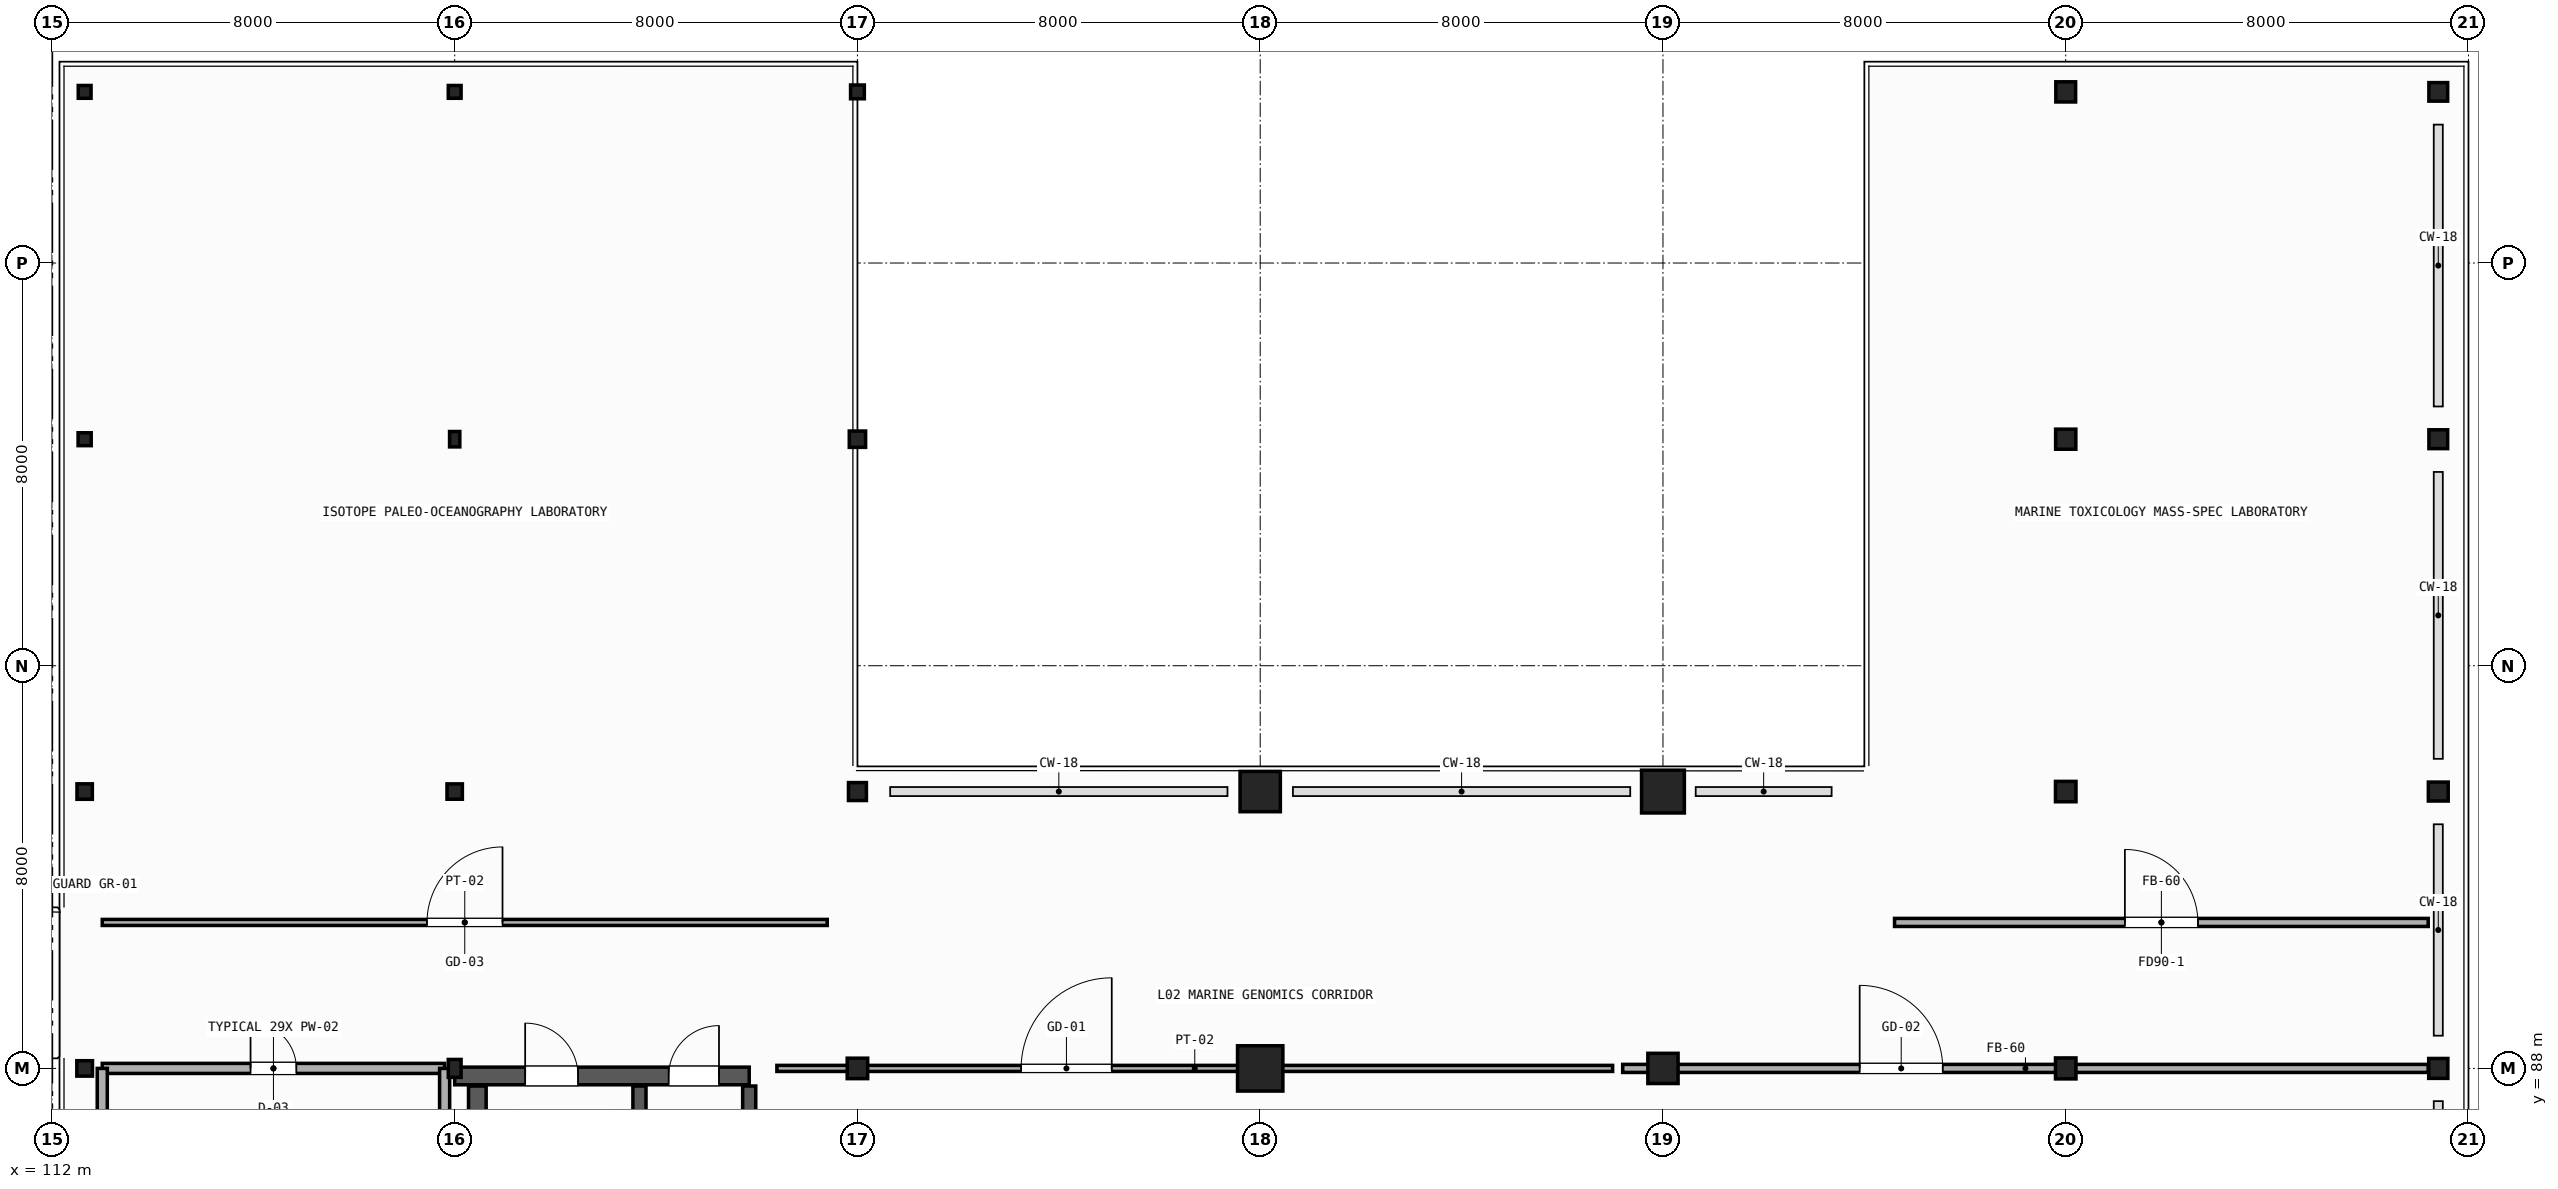
"""IFC4 building model, lengths in metres.
Left out: names, types, materials, properties, quantities, classifications, styles, units other than length and angle.
Written with IfcOpenShell. Run it as: python <this file> out.ifc"""

import sys

from ifc_helpers import new_model, si_unit, direction, frame, frame_2d, origin, origin_2d, place, context, subcontext, project, spatial, rectangle, hollow_rectangle, circle, hollow_circle, i_section, extrude, element, fill, save


model = new_model("IFC4")
c1 = context("Model", 3, precision=1e-05, world=origin(), true_north=direction((0.0, 1.0)))
c2 = subcontext(c1, "Body", "Model", "MODEL_VIEW")
j1 = project(units=[si_unit("LENGTHUNIT", "METRE"), si_unit("PLANEANGLEUNIT", "RADIAN")], contexts=[c1])
p1 = place(None, origin())
s1 = spatial("IfcSite", under=j1, at=p1, CompositionType="ELEMENT")
p2 = place(p1, origin())
s2 = spatial("IfcBuilding", under=s1, at=p2, CompositionType="ELEMENT")
p3 = place(p2, frame((0.0, 0.0, 10.2)))
s3 = spatial("IfcBuildingStorey", under=s2, at=p3, CompositionType="ELEMENT", Elevation=10.2)
p4 = place(p3, frame((112.65, 88.0, 0.0), z_axis=(0.0, 0.0, 1.0), x_axis=(0.0, 1.0, 0.0)))
e1 = element("IfcColumn", 1, at=p4, inside=s3, PredefinedType="COLUMN", context=c2, shape_type="SweptSolid", body=[
    extrude(i_section(OverallWidth=0.306, OverallDepth=0.311, WebThickness=0.011, FlangeThickness=0.017, FilletRadius=0.013, at=origin_2d()), origin(), (0.0, 0.0, 1.0), 4.56),
])
p5 = place(p3, frame((112.65, 93.5, 0.0), z_axis=(0.0, 0.0, 1.0), x_axis=(1.0, 0.0, 0.0)))
e2 = element("IfcColumn", 2, at=p5, inside=s3, PredefinedType="COLUMN", context=c2, shape_type="SweptSolid", body=[
    extrude(i_section(OverallWidth=0.305, OverallDepth=0.307, WebThickness=0.01, FlangeThickness=0.015, FilletRadius=0.013, at=origin_2d()), origin(), (0.0, 0.0, 1.0), 4.56),
])
p6 = place(p3, frame((112.65, 100.5, 0.0), z_axis=(0.0, 0.0, 1.0), x_axis=(0.0, 1.0, 0.0)))
e3 = element("IfcColumn", 3, at=p6, inside=s3, PredefinedType="COLUMN", context=c2, shape_type="SweptSolid", body=[
    extrude(i_section(OverallWidth=0.256, OverallDepth=0.26, WebThickness=0.011, FlangeThickness=0.017, FilletRadius=0.011, at=origin_2d()), origin(), (0.0, 0.0, 1.0), 4.56),
])
p7 = place(p3, frame((112.65, 107.4, 0.0), z_axis=(0.0, 0.0, 1.0), x_axis=(1.0, 0.0, 0.0)))
e4 = element("IfcColumn", 4, at=p7, inside=s3, PredefinedType="COLUMN", context=c2, shape_type="SweptSolid", body=[
    extrude(i_section(OverallWidth=0.254, OverallDepth=0.254, WebThickness=0.009, FlangeThickness=0.014, FilletRadius=0.011, at=origin_2d()), origin(), (0.0, 0.0, 1.0), 4.56),
])
p8 = place(p3, frame((120.0, 88.0, 0.0), z_axis=(0.0, 0.0, 1.0), x_axis=(1.0, 0.0, 0.0)))
e5 = element("IfcColumn", 5, at=p8, inside=s3, PredefinedType="COLUMN", context=c2, shape_type="SweptSolid", body=[
    extrude(hollow_rectangle(XDim=0.254, YDim=0.356, WallThickness=0.012, InnerFilletRadius=0.012, OuterFilletRadius=0.024, at=origin_2d()), origin(), (0.0, 0.0, 1.0), 4.56),
])
p9 = place(p3, frame((120.0, 93.5, 0.0), z_axis=(0.0, 0.0, 1.0), x_axis=(0.0, 1.0, 0.0)))
e6 = element("IfcColumn", 6, at=p9, inside=s3, PredefinedType="COLUMN", context=c2, shape_type="SweptSolid", body=[
    extrude(hollow_rectangle(XDim=0.305, YDim=0.305, WallThickness=0.012, InnerFilletRadius=0.012, OuterFilletRadius=0.024, at=origin_2d()), origin(), (0.0, 0.0, 1.0), 4.56),
])
p10 = place(p3, frame((120.0, 100.5, 0.0), z_axis=(0.0, 0.0, 1.0), x_axis=(1.0, 0.0, 0.0)))
e7 = element("IfcColumn", 7, at=p10, inside=s3, PredefinedType="COLUMN", context=c2, shape_type="SweptSolid", body=[
    extrude(hollow_rectangle(XDim=0.203, YDim=0.305, WallThickness=0.009, InnerFilletRadius=0.009, OuterFilletRadius=0.018, at=origin_2d()), origin(), (0.0, 0.0, 1.0), 4.56),
])
p11 = place(p3, frame((120.0, 107.4, 0.0), z_axis=(0.0, 0.0, 1.0), x_axis=(0.0, 1.0, 0.0)))
e8 = element("IfcColumn", 8, at=p11, inside=s3, PredefinedType="COLUMN", context=c2, shape_type="SweptSolid", body=[
    extrude(hollow_rectangle(XDim=0.254, YDim=0.254, WallThickness=0.012, InnerFilletRadius=0.012, OuterFilletRadius=0.024, at=origin_2d()), origin(), (0.0, 0.0, 1.0), 4.56),
])
p12 = place(p3, frame((128.0, 88.0, 0.0), z_axis=(0.0, 0.0, 1.0), x_axis=(0.0, 1.0, 0.0)))
e9 = element("IfcColumn", 9, at=p12, inside=s3, PredefinedType="COLUMN", context=c2, shape_type="SweptSolid", body=[
    extrude(hollow_circle(Radius=0.203, WallThickness=0.012, at=origin_2d()), origin(), (0.0, 0.0, 1.0), 4.56),
])
p13 = place(p3, frame((128.0, 93.5, 0.0), z_axis=(0.0, 0.0, 1.0), x_axis=(1.0, 0.0, 0.0)))
e10 = element("IfcColumn", 10, at=p13, inside=s3, PredefinedType="COLUMN", context=c2, shape_type="SweptSolid", body=[
    extrude(hollow_circle(Radius=0.178, WallThickness=0.012, at=origin_2d()), origin(), (0.0, 0.0, 1.0), 4.56),
])
p14 = place(p3, frame((128.0, 100.5, 0.0), z_axis=(0.0, 0.0, 1.0), x_axis=(0.0, 1.0, 0.0)))
e11 = element("IfcColumn", 11, at=p14, inside=s3, PredefinedType="COLUMN", context=c2, shape_type="SweptSolid", body=[
    extrude(hollow_circle(Radius=0.162, WallThickness=0.012, at=origin_2d()), origin(), (0.0, 0.0, 1.0), 4.56),
])
p15 = place(p3, frame((128.0, 107.4, 0.0), z_axis=(0.0, 0.0, 1.0), x_axis=(1.0, 0.0, 0.0)))
e12 = element("IfcColumn", 12, at=p15, inside=s3, PredefinedType="COLUMN", context=c2, shape_type="SweptSolid", body=[
    extrude(hollow_circle(Radius=0.136, WallThickness=0.012, at=origin_2d()), origin(), (0.0, 0.0, 1.0), 4.56),
])
p16 = place(p3, frame((136.0, 88.0, 0.0), z_axis=(0.0, 0.0, 1.0), x_axis=(1.0, 0.0, 0.0)))
e13 = element("IfcColumn", 13, at=p16, inside=s3, PredefinedType="COLUMN", context=c2, shape_type="SweptSolid", body=[
    extrude(rectangle(XDim=0.9, YDim=0.9, at=origin_2d()), origin(), (0.0, 0.0, 1.0), 4.56),
])
p17 = place(p3, frame((136.0, 93.5, 0.0), z_axis=(0.0, 0.0, 1.0), x_axis=(0.0, 1.0, 0.0)))
e14 = element("IfcColumn", 14, at=p17, inside=s3, PredefinedType="COLUMN", context=c2, shape_type="SweptSolid", body=[
    extrude(rectangle(XDim=0.8, YDim=0.8, at=origin_2d()), origin(), (0.0, 0.0, 1.0), 4.56),
])
p18 = place(p3, frame((144.0, 88.0, 0.0), z_axis=(0.0, 0.0, 1.0), x_axis=(0.0, 1.0, 0.0)))
e15 = element("IfcColumn", 15, at=p18, inside=s3, PredefinedType="COLUMN", context=c2, shape_type="SweptSolid", body=[
    extrude(rectangle(XDim=0.6, YDim=0.6, at=origin_2d()), origin(), (0.0, 0.0, 1.0), 4.56),
])
p19 = place(p3, frame((144.0, 93.5, 0.0), z_axis=(0.0, 0.0, 1.0), x_axis=(1.0, 0.0, 0.0)))
e16 = element("IfcColumn", 16, at=p19, inside=s3, PredefinedType="COLUMN", context=c2, shape_type="SweptSolid", body=[
    extrude(circle(Radius=0.425, at=origin_2d()), origin(), (0.0, 0.0, 1.0), 4.56),
])
p20 = place(p3, frame((152.0, 88.0, 0.0), z_axis=(0.0, 0.0, 1.0), x_axis=(1.0, 0.0, 0.0)))
e17 = element("IfcColumn", 17, at=p20, inside=s3, PredefinedType="COLUMN", context=c2, shape_type="SweptSolid", body=[
    extrude(i_section(OverallWidth=0.406, OverallDepth=0.416, WebThickness=0.03, FlangeThickness=0.048, FilletRadius=0.015, at=origin_2d()), origin(), (0.0, 0.0, 1.0), 4.56),
])
p21 = place(p3, frame((152.0, 93.5, 0.0), z_axis=(0.0, 0.0, 1.0), x_axis=(0.0, 1.0, 0.0)))
e18 = element("IfcColumn", 18, at=p21, inside=s3, PredefinedType="COLUMN", context=c2, shape_type="SweptSolid", body=[
    extrude(i_section(OverallWidth=0.404, OverallDepth=0.407, WebThickness=0.027, FlangeThickness=0.044, FilletRadius=0.015, at=origin_2d()), origin(), (0.0, 0.0, 1.0), 4.56),
])
p22 = place(p3, frame((152.0, 100.5, 0.0), z_axis=(0.0, 0.0, 1.0), x_axis=(1.0, 0.0, 0.0)))
e19 = element("IfcColumn", 19, at=p22, inside=s3, PredefinedType="COLUMN", context=c2, shape_type="SweptSolid", body=[
    extrude(i_section(OverallWidth=0.401, OverallDepth=0.399, WebThickness=0.025, FlangeThickness=0.04, FilletRadius=0.015, at=origin_2d()), origin(), (0.0, 0.0, 1.0), 4.8),
])
p23 = place(p3, frame((152.0, 107.4, 0.0), z_axis=(0.0, 0.0, 1.0), x_axis=(0.0, 1.0, 0.0)))
e20 = element("IfcColumn", 20, at=p23, inside=s3, PredefinedType="COLUMN", context=c2, shape_type="SweptSolid", body=[
    extrude(i_section(OverallWidth=0.4, OverallDepth=0.393, WebThickness=0.023, FlangeThickness=0.037, FilletRadius=0.015, at=origin_2d()), origin(), (0.0, 0.0, 1.0), 4.8),
])
p24 = place(p3, frame((159.4, 88.0, 0.0), z_axis=(0.0, 0.0, 1.0), x_axis=(0.0, 1.0, 0.0)))
e21 = element("IfcColumn", 21, at=p24, inside=s3, PredefinedType="COLUMN", context=c2, shape_type="SweptSolid", body=[
    extrude(i_section(OverallWidth=0.395, OverallDepth=0.38, WebThickness=0.019, FlangeThickness=0.03, FilletRadius=0.015, at=origin_2d()), origin(), (0.0, 0.0, 1.0), 4.56),
])
p25 = place(p3, frame((159.4, 93.5, 0.0), z_axis=(0.0, 0.0, 1.0), x_axis=(1.0, 0.0, 0.0)))
e22 = element("IfcColumn", 22, at=p25, inside=s3, PredefinedType="COLUMN", context=c2, shape_type="SweptSolid", body=[
    extrude(i_section(OverallWidth=0.394, OverallDepth=0.376, WebThickness=0.017, FlangeThickness=0.028, FilletRadius=0.015, at=origin_2d()), origin(), (0.0, 0.0, 1.0), 4.56),
])
p26 = place(p3, frame((159.4, 100.5, 0.0), z_axis=(0.0, 0.0, 1.0), x_axis=(0.0, 1.0, 0.0)))
e23 = element("IfcColumn", 23, at=p26, inside=s3, PredefinedType="COLUMN", context=c2, shape_type="SweptSolid", body=[
    extrude(i_section(OverallWidth=0.374, OverallDepth=0.372, WebThickness=0.016, FlangeThickness=0.026, FilletRadius=0.015, at=origin_2d()), origin(), (0.0, 0.0, 1.0), 4.8),
])
p27 = place(p3, frame((159.4, 107.4, 0.0), z_axis=(0.0, 0.0, 1.0), x_axis=(1.0, 0.0, 0.0)))
e24 = element("IfcColumn", 24, at=p27, inside=s3, PredefinedType="COLUMN", context=c2, shape_type="SweptSolid", body=[
    extrude(i_section(OverallWidth=0.373, OverallDepth=0.368, WebThickness=0.015, FlangeThickness=0.024, FilletRadius=0.015, at=origin_2d()), origin(), (0.0, 0.0, 1.0), 4.8),
])
p28 = place(p3, frame((120.0, 87.85, 0.0), z_axis=(0.0, 0.0, 1.0), x_axis=(1.0, 0.0, 0.0)))
e25 = element("IfcWall", 25, at=p28, inside=s3, PredefinedType="SHEAR", context=c2, shape_type="SweptSolid", body=[
    extrude(rectangle(XDim=5.85, YDim=0.35, at=frame_2d((2.925, 0.0))), origin(), (0.0, 0.0, 1.0), 4.55),
])
p29 = place(p28, frame((1.4, 0.0, 0.0)))
e26 = element("IfcOpeningElement", 26, at=p29, cuts=e25, PredefinedType="OPENING", context=c2, shape_type="SweptSolid", body=[
    extrude(rectangle(XDim=1.05, YDim=2.1, at=frame_2d((0.525, 1.05))), frame((0.0, 0.185, 0.0), z_axis=(0.0, -1.0, 0.0), x_axis=(1.0, 0.0, 0.0)), (0.0, 0.0, 1.0), 0.37),
])
p30 = place(p28, frame((4.25, 0.0, 0.0)))
e27 = element("IfcOpeningElement", 27, at=p30, cuts=e25, PredefinedType="OPENING", context=c2, shape_type="SweptSolid", body=[
    extrude(rectangle(XDim=1.0, YDim=2.15, at=frame_2d((0.5, 1.075))), frame((0.0, 0.185, 0.0), z_axis=(0.0, -1.0, 0.0), x_axis=(1.0, 0.0, 0.0)), (0.0, 0.0, 1.0), 0.37),
])
p31 = place(p3, frame((120.45, 80.7, 0.0), z_axis=(0.0, 0.0, 1.0), x_axis=(0.0, 1.0, 0.0)))
e28 = element("IfcWall", 28, at=p31, inside=s3, PredefinedType="SHEAR", context=c2, shape_type="SweptSolid", body=[
    extrude(rectangle(XDim=6.95, YDim=0.35, at=frame_2d((3.475, 0.0))), origin(), (0.0, 0.0, 1.0), 4.55),
])
for number, where, z_axis, x_axis in (
    (29, (125.85, 80.7, 0.0), (0.0, 0.0, 1.0), (0.0, 1.0, 0.0)),
    (30, (123.67, 80.7, 0.0), (0.0, 0.0, 1.0), (0.0, 1.0, 0.0)),
):
    element("IfcWall", number, at=place(p3, frame(where, z_axis=z_axis, x_axis=x_axis)), inside=s3, PredefinedType="SHEAR", context=c2, shape_type="SweptSolid", body=[
        extrude(rectangle(XDim=6.95, YDim=0.26, at=frame_2d((3.475, 0.0))), origin(), (0.0, 0.0, 1.0), 4.55),
    ])
p32 = place(p3, frame((113.0, 88.0, 0.0), z_axis=(0.0, 0.0, 1.0), x_axis=(1.0, 0.0, 0.0)))
e31 = element("IfcWall", 31, at=p32, inside=s3, PredefinedType="PLUMBINGWALL", context=c2, shape_type="SweptSolid", body=[
    extrude(rectangle(XDim=6.8, YDim=0.2, at=frame_2d((3.4, 0.0))), origin(), (0.0, 0.0, 1.0), 3.908),
])
p33 = place(p32, frame((2.945, 0.0, 0.0)))
e32 = element("IfcOpeningElement", 32, at=p33, cuts=e31, PredefinedType="OPENING", context=c2, shape_type="SweptSolid", body=[
    extrude(rectangle(XDim=0.91, YDim=2.1, at=frame_2d((0.455, 1.05))), frame((0.0, 0.11, 0.0), z_axis=(0.0, -1.0, 0.0), x_axis=(1.0, 0.0, 0.0)), (0.0, 0.0, 1.0), 0.22),
])
p34 = place(p3, frame((113.0, 80.8, 0.0), z_axis=(0.0, 0.0, 1.0), x_axis=(0.0, 1.0, 0.0)))
e33 = element("IfcWall", 33, at=p34, inside=s3, PredefinedType="PLUMBINGWALL", context=c2, shape_type="SweptSolid", body=[
    extrude(rectangle(XDim=7.2, YDim=0.2, at=frame_2d((3.6, 0.0))), origin(), (0.0, 0.0, 1.0), 4.29),
])
p35 = place(p3, frame((119.8, 80.8, 0.0), z_axis=(0.0, 0.0, 1.0), x_axis=(0.0, 1.0, 0.0)))
e34 = element("IfcWall", 34, at=p35, inside=s3, PredefinedType="PLUMBINGWALL", context=c2, shape_type="SweptSolid", body=[
    extrude(rectangle(XDim=7.2, YDim=0.2, at=frame_2d((3.6, 0.0))), origin(), (0.0, 0.0, 1.0), 3.918),
])
p36 = place(p3, frame((126.4, 88.0, 0.0), z_axis=(0.0, 0.0, 1.0), x_axis=(1.0, 0.0, 0.0)))
e35 = element("IfcWall", 35, at=p36, inside=s3, PredefinedType="PARTITIONING", context=c2, shape_type="SweptSolid", body=[
    extrude(rectangle(XDim=16.6, YDim=0.12, at=frame_2d((8.3, 0.0))), origin(), (0.0, 0.0, 1.0), 3.758),
])
p37 = place(p36, frame((4.851, 0.0, 0.0)))
e36 = element("IfcOpeningElement", 36, at=p37, cuts=e35, PredefinedType="OPENING", context=c2, shape_type="SweptSolid", body=[
    extrude(rectangle(XDim=1.8, YDim=2.4, at=frame_2d((0.9, 1.2))), frame((0.0, 0.07, 0.0), z_axis=(0.0, -1.0, 0.0), x_axis=(1.0, 0.0, 0.0)), (0.0, 0.0, 1.0), 0.14),
])
p38 = place(p3, frame((143.2, 88.0, 0.0), z_axis=(0.0, 0.0, 1.0), x_axis=(1.0, 0.0, 0.0)))
e37 = element("IfcWall", 37, at=p38, inside=s3, PredefinedType="PARTITIONING", context=c2, shape_type="SweptSolid", body=[
    extrude(rectangle(XDim=16.0, YDim=0.16, at=frame_2d((8.0, 0.0))), origin(), (0.0, 0.0, 1.0), 3.758),
])
p39 = place(p38, frame((4.707, 0.0, 0.0)))
e38 = element("IfcOpeningElement", 38, at=p39, cuts=e37, PredefinedType="OPENING", context=c2, shape_type="SweptSolid", body=[
    extrude(rectangle(XDim=1.65, YDim=2.35, at=frame_2d((0.825, 1.175))), frame((0.0, 0.09, 0.0), z_axis=(0.0, -1.0, 0.0), x_axis=(1.0, 0.0, 0.0)), (0.0, 0.0, 1.0), 0.18),
])
p40 = place(p3, frame((113.0, 90.9, 0.0), z_axis=(0.0, 0.0, 1.0), x_axis=(1.0, 0.0, 0.0)))
e39 = element("IfcWall", 39, at=p40, inside=s3, PredefinedType="PARTITIONING", context=c2, shape_type="SweptSolid", body=[
    extrude(rectangle(XDim=14.4, YDim=0.12, at=frame_2d((7.2, 0.0))), origin(), (0.0, 0.0, 1.0), 3.987),
])
p41 = place(p40, frame((6.45, 0.0, 0.0)))
e40 = element("IfcOpeningElement", 40, at=p41, cuts=e39, PredefinedType="OPENING", context=c2, shape_type="SweptSolid", body=[
    extrude(rectangle(XDim=1.5, YDim=2.3, at=frame_2d((0.75, 1.15))), frame((0.0, 0.07, 0.0), z_axis=(0.0, -1.0, 0.0), x_axis=(1.0, 0.0, 0.0)), (0.0, 0.0, 1.0), 0.14),
])
p42 = place(p3, frame((148.6, 90.9, 0.0), z_axis=(0.0, 0.0, 1.0), x_axis=(1.0, 0.0, 0.0)))
e41 = element("IfcWall", 41, at=p42, inside=s3, PredefinedType="PARTITIONING", context=c2, shape_type="SweptSolid", body=[
    extrude(rectangle(XDim=10.6, YDim=0.16, at=frame_2d((5.3, 0.0))), origin(), (0.0, 0.0, 1.0), 3.842),
])
p43 = place(p42, frame((4.575, 0.0, 0.0)))
e42 = element("IfcOpeningElement", 42, at=p43, cuts=e41, PredefinedType="OPENING", context=c2, shape_type="SweptSolid", body=[
    extrude(rectangle(XDim=1.45, YDim=2.25, at=frame_2d((0.725, 1.125))), frame((0.0, 0.09, 0.0), z_axis=(0.0, -1.0, 0.0), x_axis=(1.0, 0.0, 0.0)), (0.0, 0.0, 1.0), 0.18),
])
p44 = place(p29, origin())
e43 = element("IfcDoor", 43, at=p44, inside=s3, OperationType="SINGLE_SWING_LEFT", PredefinedType="DOOR", context=c2, shape_type="SweptSolid", body=[
    extrude(rectangle(XDim=1.05, YDim=2.1, at=frame_2d((0.525, 1.05))), frame((0.0, 0.025, 0.0), z_axis=(0.0, -1.0, 0.0), x_axis=(1.0, 0.0, 0.0)), (0.0, 0.0, 1.0), 0.05),
])
fill(e26, e43)
p45 = place(p30, origin())
e44 = element("IfcDoor", 44, at=p45, inside=s3, OperationType="SINGLE_SWING_RIGHT", PredefinedType="DOOR", context=c2, shape_type="SweptSolid", body=[
    extrude(rectangle(XDim=1.0, YDim=2.15, at=frame_2d((0.5, 1.075))), frame((0.0, 0.025, 0.0), z_axis=(0.0, -1.0, 0.0), x_axis=(1.0, 0.0, 0.0)), (0.0, 0.0, 1.0), 0.05),
])
fill(e27, e44)
p46 = place(p33, origin())
e45 = element("IfcDoor", 45, at=p46, inside=s3, OperationType="SINGLE_SWING_LEFT", PredefinedType="DOOR", context=c2, shape_type="SweptSolid", body=[
    extrude(rectangle(XDim=0.91, YDim=2.1, at=frame_2d((0.455, 1.05))), frame((0.0, 0.025, 0.0), z_axis=(0.0, -1.0, 0.0), x_axis=(1.0, 0.0, 0.0)), (0.0, 0.0, 1.0), 0.05),
])
fill(e32, e45)
p47 = place(p37, origin())
e46 = element("IfcDoor", 46, at=p47, inside=s3, OperationType="SINGLE_SWING_RIGHT", PredefinedType="DOOR", context=c2, shape_type="SweptSolid", body=[
    extrude(rectangle(XDim=1.8, YDim=2.4, at=frame_2d((0.9, 1.2))), frame((0.0, 0.025, 0.0), z_axis=(0.0, -1.0, 0.0), x_axis=(1.0, 0.0, 0.0)), (0.0, 0.0, 1.0), 0.05),
])
fill(e36, e46)
p48 = place(p39, origin())
e47 = element("IfcDoor", 47, at=p48, inside=s3, OperationType="SINGLE_SWING_LEFT", PredefinedType="DOOR", context=c2, shape_type="SweptSolid", body=[
    extrude(rectangle(XDim=1.65, YDim=2.35, at=frame_2d((0.825, 1.175))), frame((0.0, 0.025, 0.0), z_axis=(0.0, -1.0, 0.0), x_axis=(1.0, 0.0, 0.0)), (0.0, 0.0, 1.0), 0.05),
])
fill(e38, e47)
p49 = place(p41, origin())
e48 = element("IfcDoor", 48, at=p49, inside=s3, OperationType="SINGLE_SWING_RIGHT", PredefinedType="DOOR", context=c2, shape_type="SweptSolid", body=[
    extrude(rectangle(XDim=1.5, YDim=2.3, at=frame_2d((0.75, 1.15))), frame((0.0, 0.025, 0.0), z_axis=(0.0, -1.0, 0.0), x_axis=(1.0, 0.0, 0.0)), (0.0, 0.0, 1.0), 0.05),
])
fill(e40, e48)
p50 = place(p43, origin())
e49 = element("IfcDoor", 49, at=p50, inside=s3, OperationType="SINGLE_SWING_LEFT", PredefinedType="DOOR", context=c2, shape_type="SweptSolid", body=[
    extrude(rectangle(XDim=1.45, YDim=2.25, at=frame_2d((0.725, 1.125))), frame((0.0, 0.025, 0.0), z_axis=(0.0, -1.0, 0.0), x_axis=(1.0, 0.0, 0.0)), (0.0, 0.0, 1.0), 0.05),
])
fill(e42, e49)
save(model, sys.argv[1])
